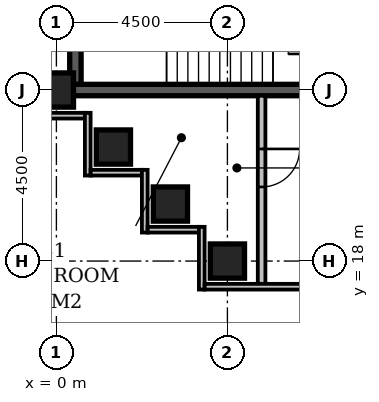
"""IFC4 building model, lengths in metres.
Left out: names, types, materials, properties, quantities, classifications, styles, units other than length and angle.
Written with IfcOpenShell. Run it as: python <this file> out.ifc"""

import sys

from ifc_helpers import new_model, si_unit, direction, frame, frame_2d, origin, origin_2d, place, context, subcontext, project, spatial, rectangle, extrude, element, fill, save


model = new_model("IFC4")
c1 = context("Model", 3, precision=1e-05, world=origin(), true_north=direction((0.0, 1.0)))
c2 = subcontext(c1, "Body", "Model", "MODEL_VIEW")
j1 = project(units=[si_unit("LENGTHUNIT", "METRE"), si_unit("PLANEANGLEUNIT", "RADIAN")], contexts=[c1])
p1 = place(None, origin())
s1 = spatial("IfcSite", under=j1, at=p1, CompositionType="ELEMENT")
p2 = place(p1, origin())
s2 = spatial("IfcBuilding", under=s1, at=p2, CompositionType="ELEMENT")
p3 = place(p2, frame((0.0, 0.0, 222.2)))
s3 = spatial("IfcBuildingStorey", under=s2, at=p3, CompositionType="ELEMENT", Elevation=222.2)
p4 = place(p3, frame((0.35, 22.5, -0.3), z_axis=(0.0, 0.0, 1.0), x_axis=(1.0, 0.0, 0.0)))
e1 = element("IfcWall", 1, at=p4, inside=s3, PredefinedType="SHEAR", context=c2, shape_type="SweptSolid", body=[
    extrude(rectangle(XDim=7.0, YDim=0.3, at=frame_2d((3.5, 0.0))), origin(), (0.0, 0.0, 1.0), 3.6),
])
p5 = place(p3, frame((0.5, 22.65, -0.3), z_axis=(0.0, 0.0, 1.0), x_axis=(0.0, 1.0, 0.0)))
e2 = element("IfcWall", 2, at=p5, inside=s3, PredefinedType="SHEAR", context=c2, shape_type="SweptSolid", body=[
    extrude(rectangle(XDim=4.2, YDim=0.3, at=frame_2d((2.1, 0.0))), origin(), (0.0, 0.0, 1.0), 3.6),
])
for number, where, z_axis, x_axis in (
    (3, (4.5, 18.0, -0.3), (0.0, 0.0, 1.0), (1.0, 0.0, 0.0)),
    (4, (3.0, 19.5, -0.3), (0.0, 0.0, 1.0), (1.0, 0.0, 0.0)),
    (5, (1.5, 21.0, -0.3), (0.0, 0.0, 1.0), (1.0, 0.0, 0.0)),
    (6, (0.0, 22.5, -0.3), (0.0, 0.0, 1.0), (1.0, 0.0, 0.0)),
):
    element("IfcColumn", number, at=place(p3, frame(where, z_axis=z_axis, x_axis=x_axis)), inside=s3, PredefinedType="COLUMN", context=c2, shape_type="SweptSolid", body=[
        extrude(rectangle(XDim=0.9, YDim=0.9, at=origin_2d()), origin(), (0.0, 0.0, 1.0), 3.6),
    ])
p6 = place(p3, frame((-0.6, 21.825, 0.0), z_axis=(0.0, 0.0, 1.0), x_axis=(1.0, 0.0, 0.0)))
e7 = element("IfcWall", 7, at=p6, inside=s3, PredefinedType="STANDARD", context=c2, shape_type="SweptSolid", body=[
    extrude(rectangle(XDim=1.35, YDim=0.15, at=frame_2d((0.675, 0.0))), origin(), (0.0, 0.0, 1.0), 2.7),
])
p7 = place(p3, frame((0.825, 21.9, 0.0), z_axis=(0.0, 0.0, 1.0), x_axis=(0.0, -1.0, 0.0)))
e8 = element("IfcWall", 8, at=p7, inside=s3, PredefinedType="STANDARD", context=c2, shape_type="SweptSolid", body=[
    extrude(rectangle(XDim=1.65, YDim=0.15, at=frame_2d((0.825, 0.0))), origin(), (0.0, 0.0, 1.0), 2.7),
])
p8 = place(p3, frame((0.9, 20.325, 0.0), z_axis=(0.0, 0.0, 1.0), x_axis=(1.0, 0.0, 0.0)))
e9 = element("IfcWall", 9, at=p8, inside=s3, PredefinedType="STANDARD", context=c2, shape_type="SweptSolid", body=[
    extrude(rectangle(XDim=1.35, YDim=0.15, at=frame_2d((0.675, 0.0))), origin(), (0.0, 0.0, 1.0), 2.7),
])
p9 = place(p3, frame((2.325, 20.4, 0.0), z_axis=(0.0, 0.0, 1.0), x_axis=(0.0, -1.0, 0.0)))
e10 = element("IfcWall", 10, at=p9, inside=s3, PredefinedType="STANDARD", context=c2, shape_type="SweptSolid", body=[
    extrude(rectangle(XDim=1.65, YDim=0.15, at=frame_2d((0.825, 0.0))), origin(), (0.0, 0.0, 1.0), 2.7),
])
p10 = place(p3, frame((2.4, 18.825, 0.0), z_axis=(0.0, 0.0, 1.0), x_axis=(1.0, 0.0, 0.0)))
e11 = element("IfcWall", 11, at=p10, inside=s3, PredefinedType="STANDARD", context=c2, shape_type="SweptSolid", body=[
    extrude(rectangle(XDim=1.35, YDim=0.15, at=frame_2d((0.675, 0.0))), origin(), (0.0, 0.0, 1.0), 2.7),
])
p11 = place(p3, frame((3.825, 18.9, 0.0), z_axis=(0.0, 0.0, 1.0), x_axis=(0.0, -1.0, 0.0)))
e12 = element("IfcWall", 12, at=p11, inside=s3, PredefinedType="STANDARD", context=c2, shape_type="SweptSolid", body=[
    extrude(rectangle(XDim=1.65, YDim=0.15, at=frame_2d((0.825, 0.0))), origin(), (0.0, 0.0, 1.0), 2.7),
])
p12 = place(p3, frame((3.9, 17.325, 0.0), z_axis=(0.0, 0.0, 1.0), x_axis=(1.0, 0.0, 0.0)))
e13 = element("IfcWall", 13, at=p12, inside=s3, PredefinedType="STANDARD", context=c2, shape_type="SweptSolid", body=[
    extrude(rectangle(XDim=19.35, YDim=0.15, at=frame_2d((9.675, 0.0))), origin(), (0.0, 0.0, 1.0), 2.7),
])
p13 = place(p12, frame((6.15, 0.0, 0.6)))
e14 = element("IfcOpeningElement", 14, at=p13, cuts=e13, PredefinedType="OPENING", context=c2, shape_type="SweptSolid", body=[
    extrude(rectangle(XDim=2.4, YDim=1.8, at=frame_2d((1.2, 0.9))), frame((0.0, 0.087, 0.0), z_axis=(0.0, -1.0, 0.0), x_axis=(1.0, 0.0, 0.0)), (0.0, 0.0, 1.0), 0.174),
])
p14 = place(p12, frame((15.15, 0.0, 0.6)))
e15 = element("IfcOpeningElement", 15, at=p14, cuts=e13, PredefinedType="OPENING", context=c2, shape_type="SweptSolid", body=[
    extrude(rectangle(XDim=2.4, YDim=1.8, at=frame_2d((1.2, 0.9))), frame((0.0, 0.087, 0.0), z_axis=(0.0, -1.0, 0.0), x_axis=(1.0, 0.0, 0.0)), (0.0, 0.0, 1.0), 0.174),
])
p15 = place(p3, frame((5.4, 17.4, 0.0), z_axis=(0.0, 0.0, 1.0), x_axis=(0.0, 1.0, 0.0)))
e16 = element("IfcWall", 16, at=p15, inside=s3, PredefinedType="PARTITIONING", context=c2, shape_type="SweptSolid", body=[
    extrude(rectangle(XDim=4.95, YDim=0.2, at=frame_2d((2.475, 0.0))), origin(), (0.0, 0.0, 1.0), 3.3),
])
p16 = place(p15, frame((2.55, 0.0, 0.0)))
e17 = element("IfcOpeningElement", 17, at=p16, cuts=e16, PredefinedType="OPENING", context=c2, shape_type="SweptSolid", body=[
    extrude(rectangle(XDim=1.0, YDim=2.1, at=frame_2d((0.5, 1.05))), frame((0.0, 0.112, 0.0), z_axis=(0.0, -1.0, 0.0), x_axis=(1.0, 0.0, 0.0)), (0.0, 0.0, 1.0), 0.224),
])
p17 = place(p16, origin())
e18 = element("IfcDoor", 18, at=p17, inside=s3, OperationType="SINGLE_SWING_RIGHT", PredefinedType="DOOR", context=c2, shape_type="SweptSolid", body=[
    extrude(rectangle(XDim=1.0, YDim=2.1, at=frame_2d((0.5, 1.05))), frame((0.0, 0.025, 0.0), z_axis=(0.0, -1.0, 0.0), x_axis=(1.0, 0.0, 0.0)), (0.0, 0.0, 1.0), 0.05),
])
fill(e17, e18)
save(model, sys.argv[1])
